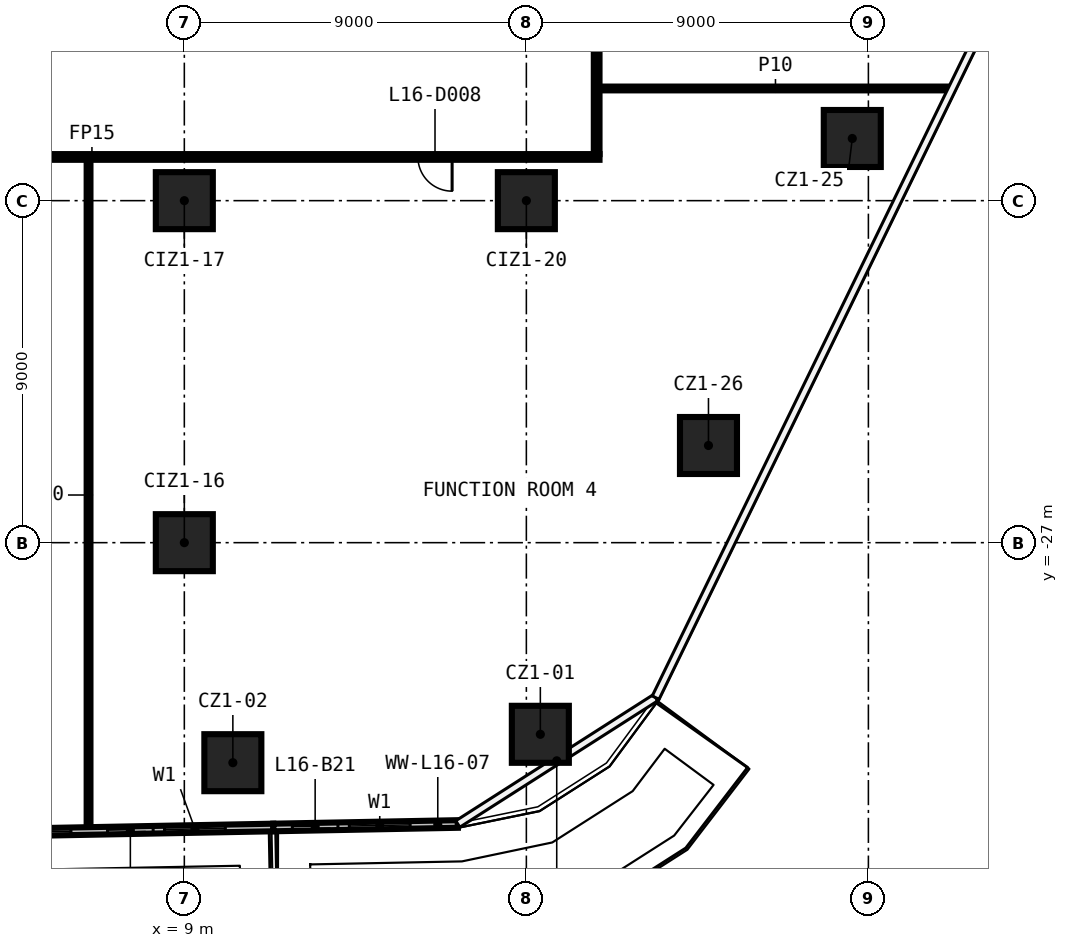
"""IFC4 building model, lengths in metres.
Left out: names, types, materials, properties, quantities, classifications, styles, units other than length and angle.
Written with IfcOpenShell. Run it as: python <this file> out.ifc"""

import sys

from ifc_helpers import new_model, si_unit, direction, frame, frame_2d, origin, origin_2d, place, context, subcontext, project, spatial, rectangle, extrude, element, fill, save


model = new_model("IFC4")
c1 = context("Model", 3, precision=1e-05, world=origin(), true_north=direction((0.0, 1.0)))
c2 = subcontext(c1, "Body", "Model", "MODEL_VIEW")
j1 = project(units=[si_unit("LENGTHUNIT", "METRE"), si_unit("PLANEANGLEUNIT", "RADIAN")], contexts=[c1])
p1 = place(None, origin())
s1 = spatial("IfcSite", under=j1, at=p1, CompositionType="ELEMENT")
p2 = place(p1, origin())
s2 = spatial("IfcBuilding", under=s1, at=p2, CompositionType="ELEMENT")
p3 = place(p2, frame((0.0, 0.0, 81.0)))
s3 = spatial("IfcBuildingStorey", under=s2, at=p3, CompositionType="ELEMENT", Elevation=81.0)
for number, where, z_axis, x_axis in (
    (1, (18.368, -32.043, 0.0), (0.0, 0.0, 1.0), (1.0, 0.0, 0.0)),
    (2, (10.277, -32.79, 0.0), (0.0, 0.0, 1.0), (1.0, 0.0, 0.0)),
    (3, (26.576, -16.364, 0.0), (0.0, 0.0, 1.0), (1.0, 0.0, 0.0)),
    (4, (22.792, -24.443, 0.0), (0.0, 0.0, 1.0), (1.0, 0.0, 0.0)),
    (5, (9.0, -27.0, 0.0), (0.0, 0.0, 1.0), (1.0, 0.0, 0.0)),
    (6, (9.0, -18.0, 0.0), (0.0, 0.0, 1.0), (1.0, 0.0, 0.0)),
    (7, (18.0, -18.0, 0.0), (0.0, 0.0, 1.0), (1.0, 0.0, 0.0)),
):
    element("IfcColumn", number, at=place(p3, frame(where, z_axis=z_axis, x_axis=x_axis)), inside=s3, PredefinedType="COLUMN", context=c2, shape_type="SweptSolid", body=[
        extrude(rectangle(XDim=1.5, YDim=1.5, at=origin_2d()), origin(), (0.0, 0.0, 1.0), 3.3),
    ])
p4 = place(p3, frame((19.925, -16.85, 0.0), z_axis=(0.0, 0.0, 1.0), x_axis=(-1.0, 0.0, 0.0)))
e8 = element("IfcWall", 8, at=p4, inside=s3, PredefinedType="PARTITIONING", context=c2, shape_type="SweptSolid", body=[
    extrude(rectangle(XDim=39.85, YDim=0.15, at=frame_2d((19.925, 0.0))), origin(), (0.0, 0.0, 1.0), 3.3),
])
p5 = place(p4, frame((35.06, 0.0, 0.0)))
e9 = element("IfcOpeningElement", 9, at=p5, cuts=e8, PredefinedType="OPENING", context=c2, shape_type="SweptSolid", body=[
    extrude(rectangle(XDim=0.9, YDim=2.1, at=frame_2d((0.45, 1.05))), frame((0.0, 0.085, 0.0), z_axis=(0.0, -1.0, 0.0), x_axis=(1.0, 0.0, 0.0)), (0.0, 0.0, 1.0), 0.17),
])
p6 = place(p4, frame((30.967, 0.0, 0.0)))
e10 = element("IfcOpeningElement", 10, at=p6, cuts=e8, PredefinedType="OPENING", context=c2, shape_type="SweptSolid", body=[
    extrude(rectangle(XDim=1.0, YDim=2.1, at=frame_2d((0.5, 1.05))), frame((0.0, 0.085, 0.0), z_axis=(0.0, -1.0, 0.0), x_axis=(1.0, 0.0, 0.0)), (0.0, 0.0, 1.0), 0.17),
])
p7 = place(p4, frame((21.934, 0.0, 0.0)))
e11 = element("IfcOpeningElement", 11, at=p7, cuts=e8, PredefinedType="OPENING", context=c2, shape_type="SweptSolid", body=[
    extrude(rectangle(XDim=0.9, YDim=2.1, at=frame_2d((0.45, 1.05))), frame((0.0, 0.085, 0.0), z_axis=(0.0, -1.0, 0.0), x_axis=(1.0, 0.0, 0.0)), (0.0, 0.0, 1.0), 0.17),
])
p8 = place(p4, frame((3.879, 0.0, 0.0)))
e12 = element("IfcOpeningElement", 12, at=p8, cuts=e8, PredefinedType="OPENING", context=c2, shape_type="SweptSolid", body=[
    extrude(rectangle(XDim=0.9, YDim=2.1, at=frame_2d((0.45, 1.05))), frame((0.0, 0.085, 0.0), z_axis=(0.0, -1.0, 0.0), x_axis=(1.0, 0.0, 0.0)), (0.0, 0.0, 1.0), 0.17),
])
p9 = place(p3, frame((19.925, -15.048, 0.0), z_axis=(0.0, 0.0, 1.0), x_axis=(1.0, 0.0, 0.0)))
e13 = element("IfcWall", 13, at=p9, inside=s3, PredefinedType="PARTITIONING", context=c2, shape_type="SweptSolid", body=[
    extrude(rectangle(XDim=9.26, YDim=0.1, at=frame_2d((4.63, 0.0))), origin(), (0.0, 0.0, 1.0), 3.3),
])
p10 = place(p3, frame((19.85, 16.775, 0.0), z_axis=(0.0, 0.0, 1.0), x_axis=(0.0, -1.0, 0.0)))
e14 = element("IfcWall", 14, at=p10, inside=s3, PredefinedType="PARTITIONING", context=c2, shape_type="SweptSolid", body=[
    extrude(rectangle(XDim=33.55, YDim=0.15, at=frame_2d((16.775, 0.0))), origin(), (0.0, 0.0, 1.0), 3.3),
])
p11 = place(p10, frame((14.19, 0.0, 0.0)))
e15 = element("IfcOpeningElement", 15, at=p11, cuts=e14, PredefinedType="OPENING", context=c2, shape_type="SweptSolid", body=[
    extrude(rectangle(XDim=0.9, YDim=2.1, at=frame_2d((0.45, 1.05))), frame((0.0, 0.085, 0.0), z_axis=(0.0, -1.0, 0.0), x_axis=(1.0, 0.0, 0.0)), (0.0, 0.0, 1.0), 0.17),
])
p12 = place(p3, frame((6.48, -34.567, 0.0), z_axis=(0.0, 0.0, 1.0), x_axis=(0.0, 1.0, 0.0)))
e16 = element("IfcWall", 16, at=p12, inside=s3, PredefinedType="PARTITIONING", context=c2, shape_type="SweptSolid", body=[
    extrude(rectangle(XDim=17.642, YDim=0.1, at=frame_2d((8.821, 0.0))), origin(), (0.0, 0.0, 1.0), 3.3),
])
p13 = place(p3, frame((-3.245, -34.771, 0.0), z_axis=(0.0, 0.0, 1.0), x_axis=(0.99982027527, 0.018958300507, 0.0)))
e17 = element("IfcWall", 17, at=p13, inside=s3, PredefinedType="SOLIDWALL", context=c2, shape_type="SweptSolid", body=[
    extrude(rectangle(XDim=14.591, YDim=0.2, at=frame_2d((7.295, 0.0))), origin(), (0.0, 0.0, 1.0), 3.3),
])
p14 = place(p13, frame((2.0, 0.0, 0.6)))
e18 = element("IfcOpeningElement", 18, at=p14, cuts=e17, PredefinedType="OPENING", context=c2, shape_type="SweptSolid", body=[
    extrude(rectangle(XDim=1.6, YDim=2.4, at=frame_2d((0.8, 1.2))), frame((0.0, 0.11, 0.0), z_axis=(0.0, -1.0, 0.0), x_axis=(1.0, 0.0, 0.0)), (0.0, 0.0, 1.0), 0.22),
])
p15 = place(p13, frame((0.5, 0.0, 0.0)))
e19 = element("IfcOpeningElement", 19, at=p15, cuts=e17, PredefinedType="OPENING", context=c2, shape_type="SweptSolid", body=[
    extrude(rectangle(XDim=1.2, YDim=2.4, at=frame_2d((0.6, 1.2))), frame((0.0, 0.11, 0.0), z_axis=(0.0, -1.0, 0.0), x_axis=(1.0, 0.0, 0.0)), (0.0, 0.0, 1.0), 0.22),
])
p16 = place(p13, frame((7.664, 0.0, 0.6)))
e20 = element("IfcOpeningElement", 20, at=p16, cuts=e17, PredefinedType="OPENING", context=c2, shape_type="SweptSolid", body=[
    extrude(rectangle(XDim=1.6, YDim=2.4, at=frame_2d((0.8, 1.2))), frame((0.0, 0.11, 0.0), z_axis=(0.0, -1.0, 0.0), x_axis=(1.0, 0.0, 0.0)), (0.0, 0.0, 1.0), 0.22),
])
p17 = place(p13, frame((6.164, 0.0, 0.0)))
e21 = element("IfcOpeningElement", 21, at=p17, cuts=e17, PredefinedType="OPENING", context=c2, shape_type="SweptSolid", body=[
    extrude(rectangle(XDim=1.2, YDim=2.4, at=frame_2d((0.6, 1.2))), frame((0.0, 0.11, 0.0), z_axis=(0.0, -1.0, 0.0), x_axis=(1.0, 0.0, 0.0)), (0.0, 0.0, 1.0), 0.22),
])
p18 = place(p13, frame((11.727, 0.0, 0.6)))
e22 = element("IfcOpeningElement", 22, at=p18, cuts=e17, PredefinedType="OPENING", context=c2, shape_type="SweptSolid", body=[
    extrude(rectangle(XDim=1.6, YDim=2.4, at=frame_2d((0.8, 1.2))), frame((0.0, 0.11, 0.0), z_axis=(0.0, -1.0, 0.0), x_axis=(1.0, 0.0, 0.0)), (0.0, 0.0, 1.0), 0.22),
])
p19 = place(p13, frame((10.227, 0.0, 0.0)))
e23 = element("IfcOpeningElement", 23, at=p19, cuts=e17, PredefinedType="OPENING", context=c2, shape_type="SweptSolid", body=[
    extrude(rectangle(XDim=1.2, YDim=2.4, at=frame_2d((0.6, 1.2))), frame((0.0, 0.11, 0.0), z_axis=(0.0, -1.0, 0.0), x_axis=(1.0, 0.0, 0.0)), (0.0, 0.0, 1.0), 0.22),
])
p20 = place(p3, frame((11.343, -34.495, 0.0), z_axis=(0.0, 0.0, 1.0), x_axis=(0.999821170107, 0.01891104985, 0.0)))
e24 = element("IfcWall", 24, at=p20, inside=s3, PredefinedType="SOLIDWALL", context=c2, shape_type="SweptSolid", body=[
    extrude(rectangle(XDim=4.854, YDim=0.2, at=frame_2d((2.427, 0.0))), origin(), (0.0, 0.0, 1.0), 3.3),
])
p21 = place(p20, frame((2.0, 0.0, 0.6)))
e25 = element("IfcOpeningElement", 25, at=p21, cuts=e24, PredefinedType="OPENING", context=c2, shape_type="SweptSolid", body=[
    extrude(rectangle(XDim=1.6, YDim=2.4, at=frame_2d((0.8, 1.2))), frame((0.0, 0.11, 0.0), z_axis=(0.0, -1.0, 0.0), x_axis=(1.0, 0.0, 0.0)), (0.0, 0.0, 1.0), 0.22),
])
p22 = place(p20, frame((0.5, 0.0, 0.0)))
e26 = element("IfcOpeningElement", 26, at=p22, cuts=e24, PredefinedType="OPENING", context=c2, shape_type="SweptSolid", body=[
    extrude(rectangle(XDim=1.2, YDim=2.4, at=frame_2d((0.6, 1.2))), frame((0.0, 0.11, 0.0), z_axis=(0.0, -1.0, 0.0), x_axis=(1.0, 0.0, 0.0)), (0.0, 0.0, 1.0), 0.22),
])
p23 = place(p8, origin())
e27 = element("IfcDoor", 27, at=p23, inside=s3, OperationType="SINGLE_SWING_LEFT", PredefinedType="DOOR", context=c2, shape_type="SweptSolid", body=[
    extrude(rectangle(XDim=0.9, YDim=2.1, at=frame_2d((0.45, 1.05))), frame((0.0, 0.025, 0.0), z_axis=(0.0, -1.0, 0.0), x_axis=(1.0, 0.0, 0.0)), (0.0, 0.0, 1.0), 0.05),
])
fill(e12, e27)
p24 = place(p16, origin())
e28 = element("IfcWindow", 28, at=p24, inside=s3, PartitioningType="SINGLE_PANEL", PredefinedType="WINDOW", context=c2, shape_type="SweptSolid", body=[
    extrude(rectangle(XDim=1.6, YDim=2.4, at=frame_2d((0.8, 1.2))), frame((0.0, 0.03, 0.0), z_axis=(0.0, -1.0, 0.0), x_axis=(1.0, 0.0, 0.0)), (0.0, 0.0, 1.0), 0.06),
])
fill(e20, e28)
p25 = place(p18, origin())
e29 = element("IfcWindow", 29, at=p25, inside=s3, PartitioningType="SINGLE_PANEL", PredefinedType="WINDOW", context=c2, shape_type="SweptSolid", body=[
    extrude(rectangle(XDim=1.6, YDim=2.4, at=frame_2d((0.8, 1.2))), frame((0.0, 0.03, 0.0), z_axis=(0.0, -1.0, 0.0), x_axis=(1.0, 0.0, 0.0)), (0.0, 0.0, 1.0), 0.06),
])
fill(e22, e29)
p26 = place(p19, origin())
e30 = element("IfcDoor", 30, at=p26, inside=s3, OperationType="SLIDING_TO_LEFT", PredefinedType="DOOR", context=c2, shape_type="SweptSolid", body=[
    extrude(rectangle(XDim=1.2, YDim=2.4, at=frame_2d((0.6, 1.2))), frame((0.0, 0.025, 0.0), z_axis=(0.0, -1.0, 0.0), x_axis=(1.0, 0.0, 0.0)), (0.0, 0.0, 1.0), 0.05),
])
fill(e23, e30)
p27 = place(p21, origin())
e31 = element("IfcWindow", 31, at=p27, inside=s3, PartitioningType="SINGLE_PANEL", PredefinedType="WINDOW", context=c2, shape_type="SweptSolid", body=[
    extrude(rectangle(XDim=1.6, YDim=2.4, at=frame_2d((0.8, 1.2))), frame((0.0, 0.03, 0.0), z_axis=(0.0, -1.0, 0.0), x_axis=(1.0, 0.0, 0.0)), (0.0, 0.0, 1.0), 0.06),
])
fill(e25, e31)
p28 = place(p22, origin())
e32 = element("IfcDoor", 32, at=p28, inside=s3, OperationType="SLIDING_TO_LEFT", PredefinedType="DOOR", context=c2, shape_type="SweptSolid", body=[
    extrude(rectangle(XDim=1.2, YDim=2.4, at=frame_2d((0.6, 1.2))), frame((0.0, 0.025, 0.0), z_axis=(0.0, -1.0, 0.0), x_axis=(1.0, 0.0, 0.0)), (0.0, 0.0, 1.0), 0.05),
])
fill(e26, e32)
save(model, sys.argv[1])
